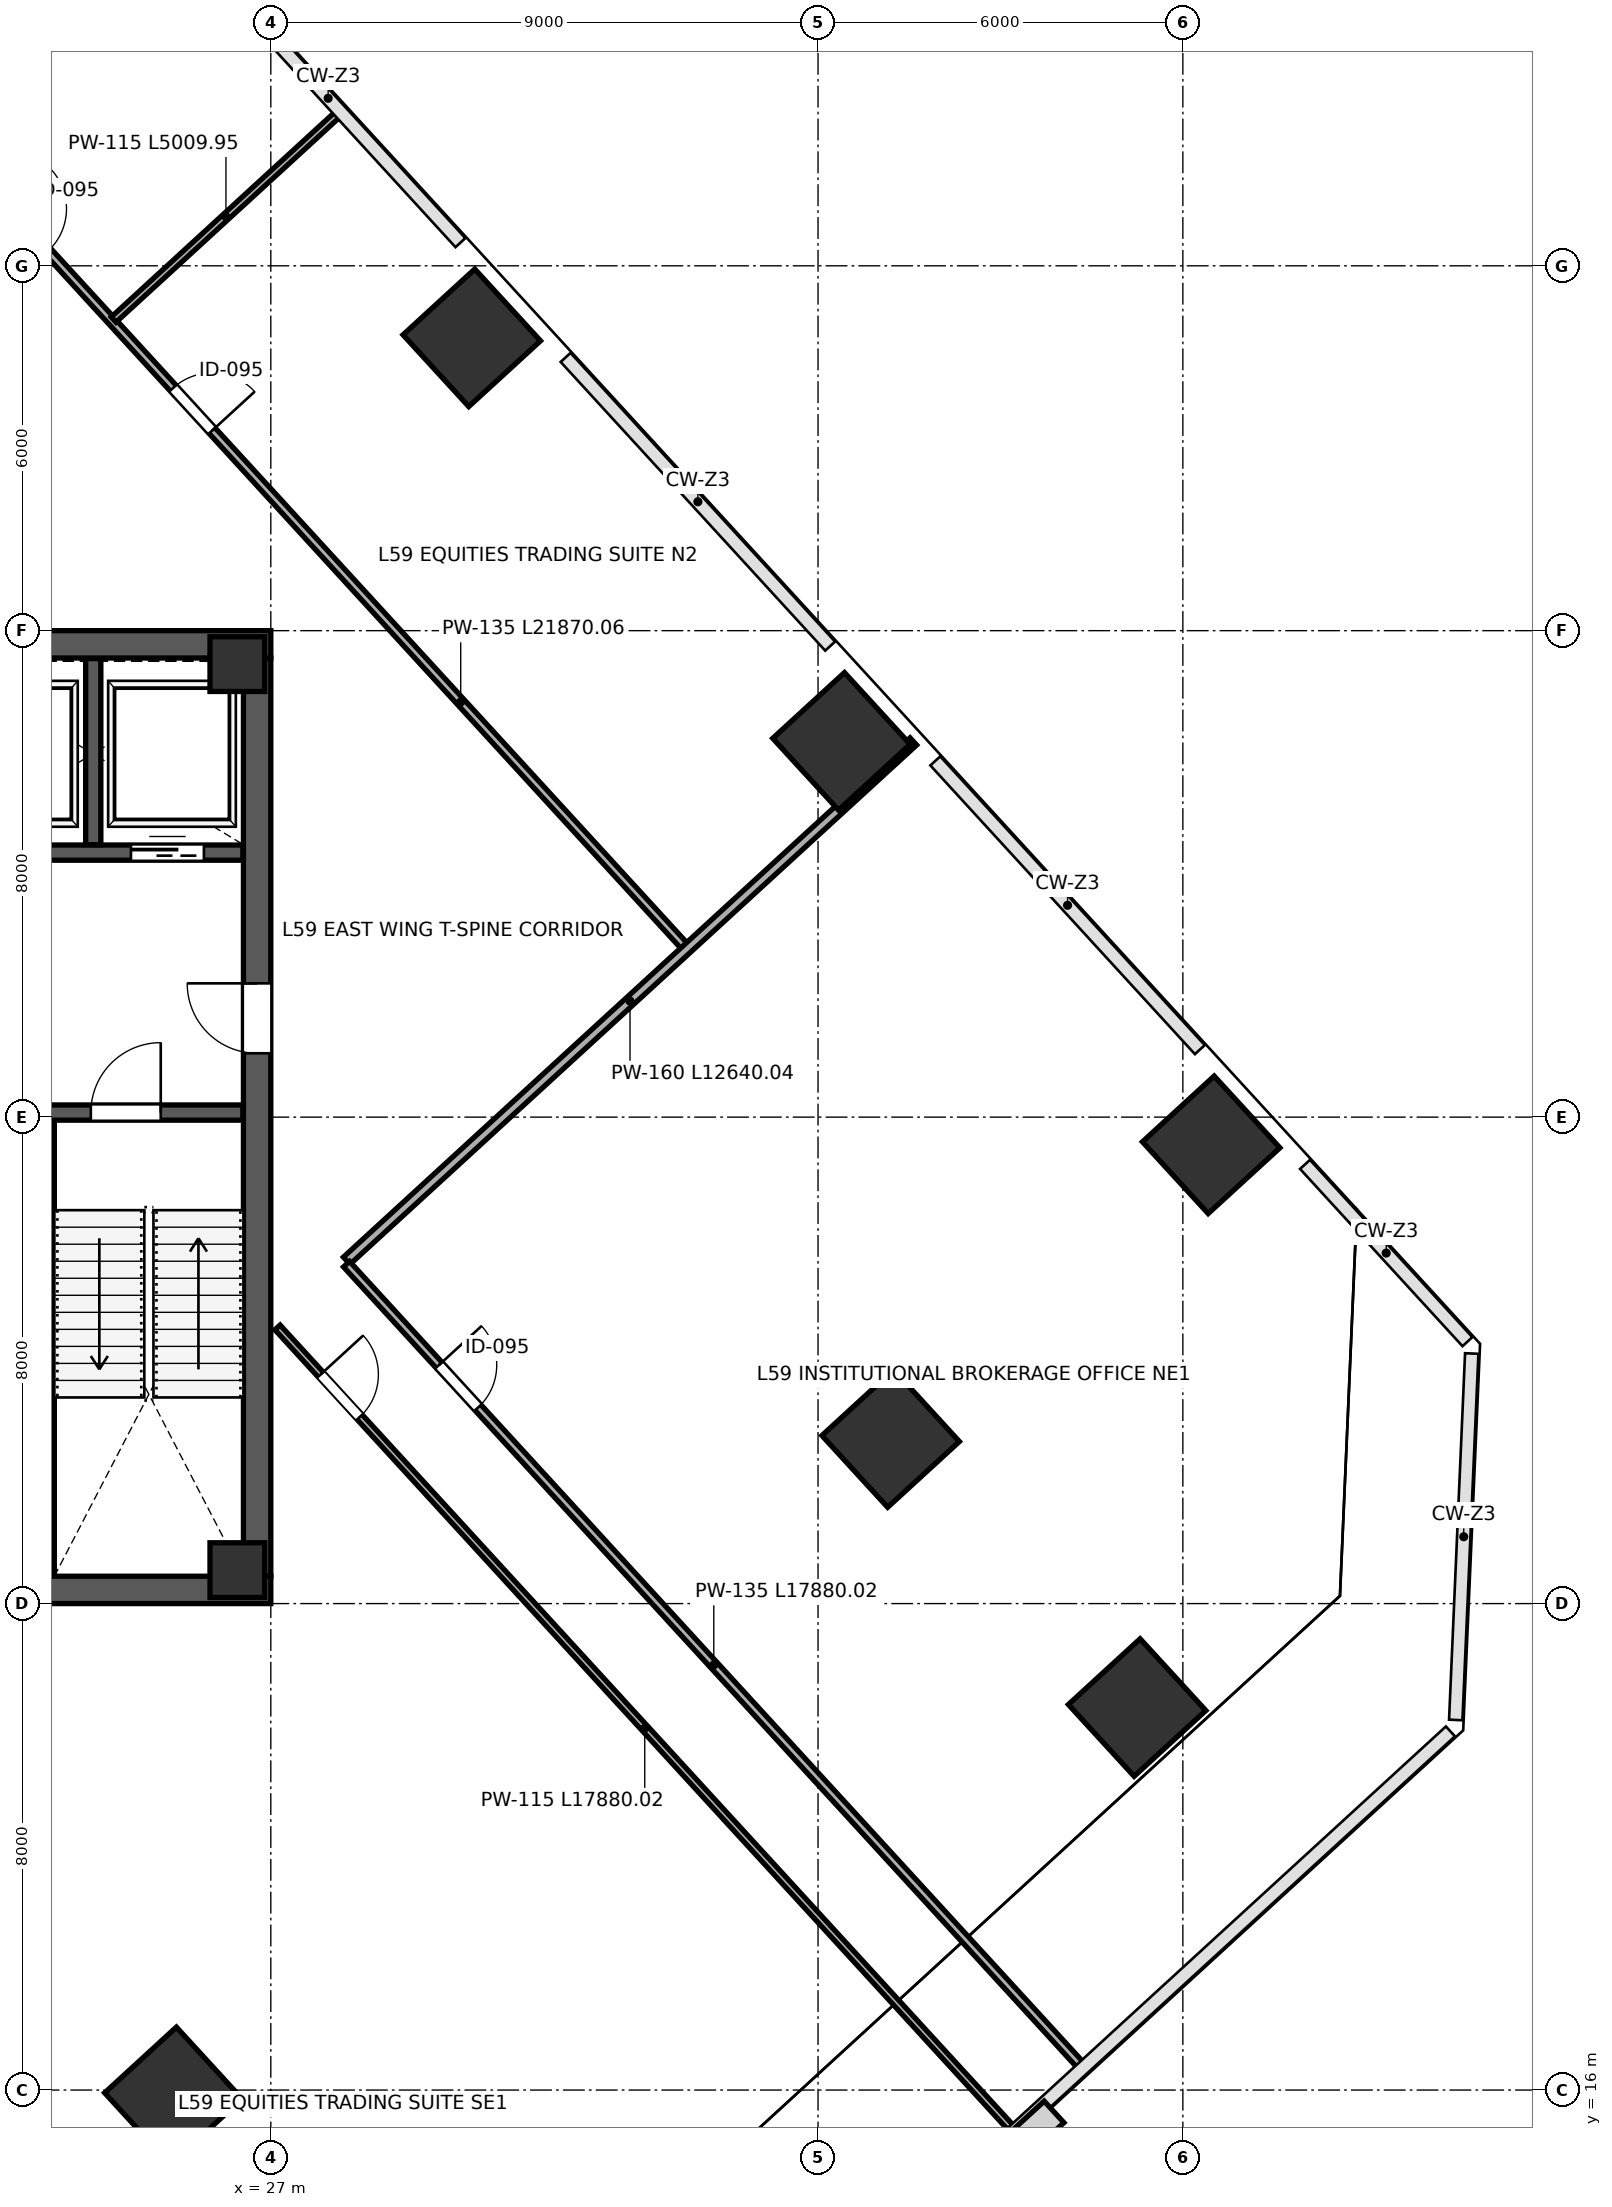
"""IFC4 building model, lengths in metres.
Left out: names, types, materials, properties, quantities, classifications, styles, units other than length and angle.
Written with IfcOpenShell. Run it as: python <this file> out.ifc"""

import sys

from ifc_helpers import new_model, si_unit, direction, frame, frame_2d, origin, origin_2d, place, context, subcontext, project, spatial, rectangle, extrude, source, transform, mapped, element, fill, save


model = new_model("IFC4")
c1 = context("Model", 3, precision=1e-05, world=origin(), true_north=direction((0.0, 1.0)))
c2 = subcontext(c1, "Body", "Model", "MODEL_VIEW")
j1 = project(units=[si_unit("LENGTHUNIT", "METRE"), si_unit("PLANEANGLEUNIT", "RADIAN")], contexts=[c1])
p1 = place(None, origin())
s1 = spatial("IfcSite", under=j1, at=p1, CompositionType="ELEMENT")
p2 = place(p1, origin())
s2 = spatial("IfcBuilding", under=s1, at=p2, CompositionType="ELEMENT")
p3 = place(p2, frame((0.0, 0.0, 262.6)))
s3 = spatial("IfcBuildingStorey", under=s2, at=p3, CompositionType="ELEMENT", Elevation=262.6)
m1 = source(origin(), c2, "Body", "SweptSolid", [
    extrude(rectangle(XDim=0.9, YDim=0.9, at=origin_2d()), origin(), (0.0, 0.0, 1.0), 4.198),
])
for number, where, z_axis, x_axis in (
    (1, (26.45, 24.55, 0.001), (0.0, 0.0, 1.0), (1.0, 0.0, 0.0)),
    (2, (26.45, 39.45, 0.001), (0.0, 0.0, 1.0), (1.0, 0.0, 0.0)),
):
    element("IfcColumn", number, at=place(p3, frame(where, z_axis=z_axis, x_axis=x_axis)), inside=s3, PredefinedType="COLUMN", context=c2, shape_type="MappedRepresentation", body=[
        mapped(m1, transform((0.0, 0.0, 0.0), scale=1.0)),
    ])
m2 = source(origin(), c2, "Body", "SweptSolid", [
    extrude(rectangle(XDim=1.6, YDim=1.6, at=origin_2d()), origin(), (0.0, 0.0, 1.0), 4.198),
])
for number, where, z_axis, x_axis in (
    (3, (30.305, 44.816, 0.001), (0.0, 0.0, 1.0), (-0.676, 0.737, 0.0)),
    (4, (36.385, 38.18, 0.001), (0.0, 0.0, 1.0), (-0.676, 0.737, 0.0)),
):
    element("IfcColumn", number, at=place(p3, frame(where, z_axis=z_axis, x_axis=x_axis)), inside=s3, PredefinedType="COLUMN", context=c2, shape_type="MappedRepresentation", body=[
        mapped(m2, transform((0.0, 0.0, 0.0), scale=1.0)),
    ])
m3 = source(origin(), c2, "Body", "SweptSolid", [
    extrude(rectangle(XDim=1.6, YDim=1.6, at=origin_2d()), origin(), (0.0, 0.0, 1.0), 4.198),
])
for number, where, z_axis, x_axis in (
    (5, (25.398, 15.905, 0.001), (0.0, 0.0, 1.0), (-0.676, 0.737, 0.0)),
    (6, (37.194, 26.714, 0.001), (0.0, 0.0, 1.0), (-0.676, 0.737, 0.0)),
):
    element("IfcColumn", number, at=place(p3, frame(where, z_axis=z_axis, x_axis=x_axis)), inside=s3, PredefinedType="COLUMN", context=c2, shape_type="MappedRepresentation", body=[
        mapped(m3, transform((0.0, 0.0, 0.0), scale=1.0)),
    ])
for number, where, z_axis, x_axis in (
    (7, (42.466, 31.545, 0.001), (0.0, 0.0, 1.0), (-0.676, 0.737, 0.0)),
    (8, (41.248, 22.291, 0.001), (0.0, 0.0, 1.0), (-0.676, 0.737, 0.0)),
):
    element("IfcColumn", number, at=place(p3, frame(where, z_axis=z_axis, x_axis=x_axis)), inside=s3, PredefinedType="COLUMN", context=c2, shape_type="MappedRepresentation", body=[
        mapped(m2, transform((0.0, 0.0, 0.0), scale=1.0)),
    ])
p4 = place(p3, frame((26.775, 24.45, 0.0), z_axis=(0.0, 0.0, 1.0), x_axis=(0.0, 1.0, 0.0)))
e9 = element("IfcWall", 9, at=p4, inside=s3, PredefinedType="SHEAR", context=c2, shape_type="SweptSolid", body=[
    extrude(rectangle(XDim=15.1, YDim=0.45, at=frame_2d((7.55, 0.0))), origin(), (0.0, 0.0, 1.0), 3.96),
])
p5 = place(p4, frame((8.6, 0.0, 0.0)))
e10 = element("IfcOpeningElement", 10, at=p5, cuts=e9, PredefinedType="OPENING", context=c2, shape_type="SweptSolid", body=[
    extrude(rectangle(XDim=1.15, YDim=2.2, at=frame_2d((0.575, 1.1))), frame((0.0, 0.235, 0.0), z_axis=(0.0, -1.0, 0.0), x_axis=(1.0, 0.0, 0.0)), (0.0, 0.0, 1.0), 0.47),
])
for number, where, z_axis, x_axis in (
    (11, (9.0, 24.225, 0.0), (0.0, 0.0, 1.0), (1.0, 0.0, 0.0)),
    (12, (9.0, 39.775, 0.0), (0.0, 0.0, 1.0), (1.0, 0.0, 0.0)),
):
    element("IfcWall", number, at=place(p3, frame(where, z_axis=z_axis, x_axis=x_axis)), inside=s3, PredefinedType="SHEAR", context=c2, shape_type="SweptSolid", body=[
        extrude(rectangle(XDim=18.0, YDim=0.45, at=frame_2d((9.0, 0.0))), origin(), (0.0, 0.0, 1.0), 3.96),
    ])
p6 = place(p3, frame((23.315, 24.46, 0.0), z_axis=(0.0, 0.0, 1.0), x_axis=(0.0, 1.0, 0.0)))
e13 = element("IfcWall", 13, at=p6, inside=s3, PredefinedType="SHEAR", context=c2, shape_type="SweptSolid", body=[
    extrude(rectangle(XDim=7.49, YDim=0.25, at=frame_2d((3.745, 0.0))), origin(), (0.0, 0.0, 1.0), 3.96),
])
p7 = place(p3, frame((23.19, 32.075, 0.0), z_axis=(0.0, 0.0, 1.0), x_axis=(1.0, 0.0, 0.0)))
e14 = element("IfcWall", 14, at=p7, inside=s3, PredefinedType="SHEAR", context=c2, shape_type="SweptSolid", body=[
    extrude(rectangle(XDim=3.35, YDim=0.25, at=frame_2d((1.675, 0.0))), origin(), (0.0, 0.0, 1.0), 3.96),
])
p8 = place(p7, frame((0.85, 0.0, 0.0)))
e15 = element("IfcOpeningElement", 15, at=p8, cuts=e14, PredefinedType="OPENING", context=c2, shape_type="SweptSolid", body=[
    extrude(rectangle(XDim=1.15, YDim=2.2, at=frame_2d((0.575, 1.1))), frame((0.0, 0.135, 0.0), z_axis=(0.0, -1.0, 0.0), x_axis=(1.0, 0.0, 0.0)), (0.0, 0.0, 1.0), 0.27),
])
p9 = place(p3, frame((21.45, 36.35, 0.0), z_axis=(0.0, 0.0, 1.0), x_axis=(1.0, 0.0, 0.0)))
e16 = element("IfcWall", 16, at=p9, inside=s3, PredefinedType="SHEAR", context=c2, shape_type="SweptSolid", body=[
    extrude(rectangle(XDim=5.09, YDim=0.25, at=frame_2d((2.545, 0.0))), origin(), (0.0, 0.0, 1.0), 3.96),
])
p10 = place(p9, frame((0.7, 0.0, 0.0)))
e17 = element("IfcOpeningElement", 17, at=p10, cuts=e16, PredefinedType="OPENING", context=c2, shape_type="SweptSolid", body=[
    extrude(rectangle(XDim=1.2, YDim=2.2, at=frame_2d((0.6, 1.1))), frame((0.0, 0.135, 0.0), z_axis=(0.0, -1.0, 0.0), x_axis=(1.0, 0.0, 0.0)), (0.0, 0.0, 1.0), 0.27),
])
p11 = place(p9, frame((3.25, 0.0, 0.0)))
e18 = element("IfcOpeningElement", 18, at=p11, cuts=e16, PredefinedType="OPENING", context=c2, shape_type="SweptSolid", body=[
    extrude(rectangle(XDim=1.2, YDim=2.2, at=frame_2d((0.6, 1.1))), frame((0.0, 0.135, 0.0), z_axis=(0.0, -1.0, 0.0), x_axis=(1.0, 0.0, 0.0)), (0.0, 0.0, 1.0), 0.27),
])
p12 = place(p3, frame((24.08, 36.48, 0.0), z_axis=(0.0, 0.0, 1.0), x_axis=(0.0, 1.0, 0.0)))
e19 = element("IfcWall", 19, at=p12, inside=s3, PredefinedType="SHEAR", context=c2, shape_type="SweptSolid", body=[
    extrude(rectangle(XDim=3.06, YDim=0.25, at=frame_2d((1.53, 0.0))), origin(), (0.0, 0.0, 1.0), 3.96),
])
p13 = place(p3, frame((19.042, 50.92, 0.0), z_axis=(0.0, 0.0, 1.0), x_axis=(0.675589646996, -0.737277850523, 0.0)))
e20 = element("IfcWall", 20, at=p13, inside=s3, PredefinedType="PARTITIONING", context=c2, shape_type="SweptSolid", body=[
    extrude(rectangle(XDim=21.87, YDim=0.135, at=frame_2d((10.935, 0.0))), origin(), (0.0, 0.0, 1.0), 3.96),
])
p14 = place(p13, frame((5.4, 0.0, 0.0)))
e21 = element("IfcOpeningElement", 21, at=p14, cuts=e20, PredefinedType="OPENING", context=c2, shape_type="SweptSolid", body=[
    extrude(rectangle(XDim=0.95, YDim=2.15, at=frame_2d((0.475, 1.075))), frame((0.0, 0.078, 0.0), z_axis=(0.0, -1.0, 0.0), x_axis=(1.0, 0.0, 0.0)), (0.0, 0.0, 1.0), 0.155),
])
p15 = place(p13, frame((9.4, 0.0, 0.0)))
e22 = element("IfcOpeningElement", 22, at=p15, cuts=e20, PredefinedType="OPENING", context=c2, shape_type="SweptSolid", body=[
    extrude(rectangle(XDim=0.95, YDim=2.15, at=frame_2d((0.475, 1.075))), frame((0.0, 0.078, 0.0), z_axis=(0.0, -1.0, 0.0), x_axis=(1.0, 0.0, 0.0)), (0.0, 0.0, 1.0), 0.155),
])
p16 = place(p3, frame((24.415, 45.115, 0.0), z_axis=(0.0, 0.0, 1.0), x_axis=(0.737279537385, 0.675587806101, 0.0)))
e23 = element("IfcWall", 23, at=p16, inside=s3, PredefinedType="PARTITIONING", context=c2, shape_type="SweptSolid", body=[
    extrude(rectangle(XDim=5.01, YDim=0.115, at=frame_2d((2.505, 0.0))), origin(), (0.0, 0.0, 1.0), 3.295),
])
p17 = place(p3, frame((28.248, 29.639, 0.0), z_axis=(0.0, 0.0, 1.0), x_axis=(0.73728000412, 0.675587296746, 0.0)))
e24 = element("IfcWall", 24, at=p17, inside=s3, PredefinedType="PARTITIONING", context=c2, shape_type="SweptSolid", body=[
    extrude(rectangle(XDim=12.64, YDim=0.16, at=frame_2d((6.32, 0.0))), origin(), (0.0, 0.0, 1.0), 3.295),
])
p18 = place(p3, frame((28.246, 29.582, 0.0), z_axis=(0.0, 0.0, 1.0), x_axis=(0.67559539026, -0.737272587758, 0.0)))
e25 = element("IfcWall", 25, at=p18, inside=s3, PredefinedType="PARTITIONING", context=c2, shape_type="SweptSolid", body=[
    extrude(rectangle(XDim=17.88, YDim=0.135, at=frame_2d((8.94, 0.0))), origin(), (0.0, 0.0, 1.0), 3.96),
])
p19 = place(p18, frame((2.25, 0.0, 0.0)))
e26 = element("IfcOpeningElement", 26, at=p19, cuts=e25, PredefinedType="OPENING", context=c2, shape_type="SweptSolid", body=[
    extrude(rectangle(XDim=0.95, YDim=2.15, at=frame_2d((0.475, 1.075))), frame((0.0, 0.078, 0.0), z_axis=(0.0, -1.0, 0.0), x_axis=(1.0, 0.0, 0.0)), (0.0, 0.0, 1.0), 0.155),
])
p20 = place(p3, frame((27.11, 28.542, 0.0), z_axis=(0.0, 0.0, 1.0), x_axis=(0.675588589041, -0.737278819957, 0.0)))
e27 = element("IfcWall", 27, at=p20, inside=s3, PredefinedType="PARTITIONING", context=c2, shape_type="SweptSolid", body=[
    extrude(rectangle(XDim=17.88, YDim=0.115, at=frame_2d((8.94, 0.0))), origin(), (0.0, 0.0, 1.0), 3.96),
])
p21 = place(p20, frame((1.05, 0.0, 0.0)))
e28 = element("IfcOpeningElement", 28, at=p21, cuts=e27, PredefinedType="OPENING", context=c2, shape_type="SweptSolid", body=[
    extrude(rectangle(XDim=0.95, YDim=2.15, at=frame_2d((0.475, 1.075))), frame((0.0, 0.067, 0.0), z_axis=(0.0, -1.0, 0.0), x_axis=(1.0, 0.0, 0.0)), (0.0, 0.0, 1.0), 0.135),
])
m4 = source(origin(), c2, "Body", "SweptSolid", [
    extrude(rectangle(XDim=1.15, YDim=2.2, at=frame_2d((0.575, 1.1))), frame((0.0, 0.025, 0.0), z_axis=(0.0, -1.0, 0.0), x_axis=(1.0, 0.0, 0.0)), (0.0, 0.0, 1.0), 0.05),
])
p22 = place(p8, origin())
e29 = element("IfcDoor", 29, at=p22, inside=s3, OperationType="SINGLE_SWING_RIGHT", PredefinedType="DOOR", context=c2, shape_type="MappedRepresentation", body=[
    mapped(m4, transform((0.0, 0.0, 0.0), scale=1.0)),
])
fill(e15, e29)
m5 = source(origin(), c2, "Body", "SweptSolid", [
    extrude(rectangle(XDim=1.15, YDim=2.2, at=frame_2d((0.575, 1.1))), frame((0.0, 0.025, 0.0), z_axis=(0.0, -1.0, 0.0), x_axis=(1.0, 0.0, 0.0)), (0.0, 0.0, 1.0), 0.05),
])
p23 = place(p5, origin())
e30 = element("IfcDoor", 30, at=p23, inside=s3, OperationType="SINGLE_SWING_RIGHT", PredefinedType="DOOR", context=c2, shape_type="MappedRepresentation", body=[
    mapped(m5, transform((0.0, 0.0, 0.0), scale=1.0)),
])
fill(e10, e30)
m6 = source(origin(), c2, "Body", "SweptSolid", [
    extrude(rectangle(XDim=1.2, YDim=2.2, at=frame_2d((0.6, 1.1))), frame((0.0, 0.025, 0.0), z_axis=(0.0, -1.0, 0.0), x_axis=(1.0, 0.0, 0.0)), (0.0, 0.0, 1.0), 0.05),
])
p24 = place(p11, origin())
e31 = element("IfcDoor", 31, at=p24, inside=s3, OperationType="SLIDING_TO_RIGHT", PredefinedType="DOOR", context=c2, shape_type="MappedRepresentation", body=[
    mapped(m6, transform((0.0, 0.0, 0.0), scale=1.0)),
])
fill(e18, e31)
m7 = source(origin(), c2, "Body", "SweptSolid", [
    extrude(rectangle(XDim=0.95, YDim=2.15, at=frame_2d((0.475, 1.075))), frame((0.0, 0.025, 0.0), z_axis=(0.0, -1.0, 0.0), x_axis=(1.0, 0.0, 0.0)), (0.0, 0.0, 1.0), 0.05),
])
p25 = place(p15, origin())
e32 = element("IfcDoor", 32, at=p25, inside=s3, OperationType="SINGLE_SWING_RIGHT", PredefinedType="DOOR", context=c2, shape_type="MappedRepresentation", body=[
    mapped(m7, transform((0.0, 0.0, 0.0), scale=1.0)),
])
fill(e22, e32)
p26 = place(p19, origin())
e33 = element("IfcDoor", 33, at=p26, inside=s3, OperationType="SINGLE_SWING_LEFT", PredefinedType="DOOR", context=c2, shape_type="MappedRepresentation", body=[
    mapped(m7, transform((0.0, 0.0, 0.0), scale=1.0)),
])
fill(e26, e33)
p27 = place(p21, origin())
e34 = element("IfcDoor", 34, at=p27, inside=s3, OperationType="SINGLE_SWING_LEFT", PredefinedType="DOOR", context=c2, shape_type="MappedRepresentation", body=[
    mapped(m7, transform((0.0, 0.0, 0.0), scale=1.0)),
])
fill(e28, e34)
save(model, sys.argv[1])
